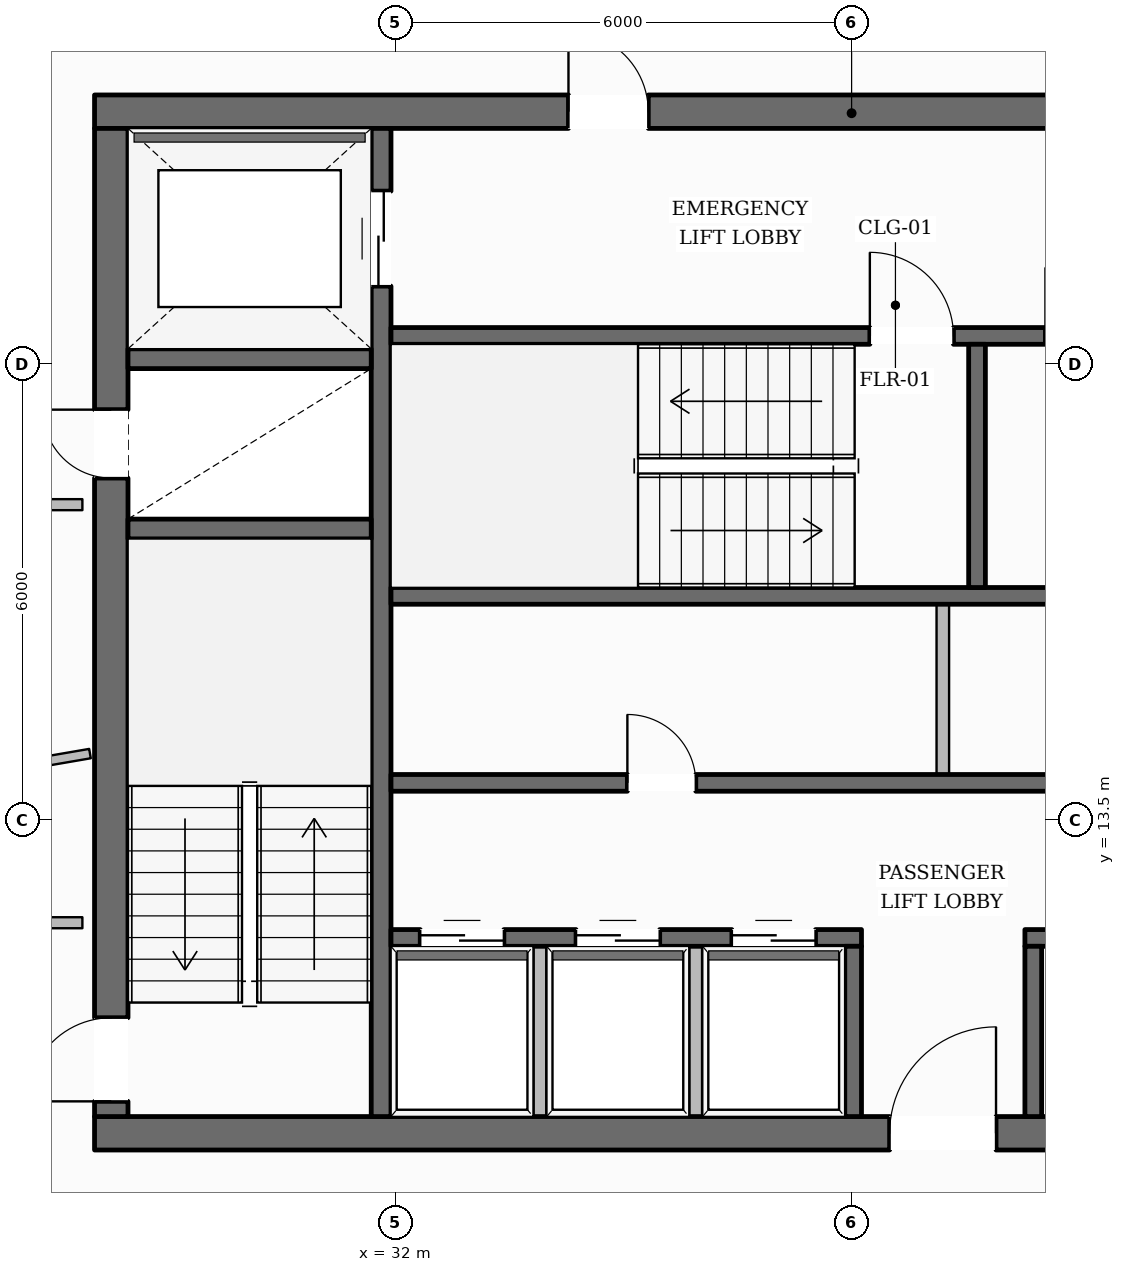
"""IFC4 building model, lengths in metres.
Left out: names, types, materials, properties, quantities, classifications, styles, units other than length and angle.
Written with IfcOpenShell. Run it as: python <this file> out.ifc"""

import sys

from ifc_helpers import new_model, si_unit, direction, frame, frame_2d, origin, place, context, subcontext, project, spatial, rectangle, extrude, element, fill, save


model = new_model("IFC4")
c1 = context("Model", 3, precision=1e-05, world=origin(), true_north=direction((0.0, 1.0)))
c2 = subcontext(c1, "Body", "Model", "MODEL_VIEW")
j1 = project(units=[si_unit("LENGTHUNIT", "METRE"), si_unit("PLANEANGLEUNIT", "RADIAN")], contexts=[c1])
p1 = place(None, origin())
s1 = spatial("IfcSite", under=j1, at=p1, CompositionType="ELEMENT")
p2 = place(p1, origin())
s2 = spatial("IfcBuilding", under=s1, at=p2, CompositionType="ELEMENT")
p3 = place(p2, frame((0.0, 0.0, 188.1)))
s3 = spatial("IfcBuildingStorey", under=s2, at=p3, CompositionType="ELEMENT", Elevation=188.1)
p4 = place(p3, frame((28.04, 9.38, 0.0), z_axis=(0.0, 0.0, 1.0), x_axis=(1.0, 0.0, 0.0)))
e1 = element("IfcWall", 1, at=p4, inside=s3, PredefinedType="SOLIDWALL", context=c2, shape_type="SweptSolid", body=[
    extrude(rectangle(XDim=19.92, YDim=0.44, at=frame_2d((9.96, 0.0))), origin(), (0.0, 0.0, 1.0), 3.6),
])
p5 = place(p4, frame((10.46, 0.0, 0.0)))
e2 = element("IfcOpeningElement", 2, at=p5, cuts=e1, PredefinedType="OPENING", context=c2, shape_type="SweptSolid", body=[
    extrude(rectangle(XDim=1.4, YDim=2.2, at=frame_2d((0.7, 1.1))), frame((0.0, 0.23, 0.0), z_axis=(0.0, -1.0, 0.0), x_axis=(1.0, 0.0, 0.0)), (0.0, 0.0, 1.0), 0.46),
])
p6 = place(p3, frame((28.04, 22.82, 0.0), z_axis=(0.0, 0.0, 1.0), x_axis=(1.0, 0.0, 0.0)))
e3 = element("IfcWall", 3, at=p6, inside=s3, PredefinedType="SOLIDWALL", context=c2, shape_type="SweptSolid", body=[
    extrude(rectangle(XDim=19.92, YDim=0.44, at=frame_2d((9.96, 0.0))), origin(), (0.0, 0.0, 1.0), 3.6),
])
p7 = place(p6, frame((6.235, 0.0, 0.0)))
e4 = element("IfcOpeningElement", 4, at=p7, cuts=e3, PredefinedType="OPENING", context=c2, shape_type="SweptSolid", body=[
    extrude(rectangle(XDim=1.05, YDim=2.15, at=frame_2d((0.525, 1.075))), frame((0.0, 0.23, 0.0), z_axis=(0.0, -1.0, 0.0), x_axis=(1.0, 0.0, 0.0)), (0.0, 0.0, 1.0), 0.46),
])
p8 = place(p6, frame((12.635, 0.0, 0.0)))
e5 = element("IfcOpeningElement", 5, at=p8, cuts=e3, PredefinedType="OPENING", context=c2, shape_type="SweptSolid", body=[
    extrude(rectangle(XDim=1.05, YDim=2.15, at=frame_2d((0.525, 1.075))), frame((0.0, 0.23, 0.0), z_axis=(0.0, -1.0, 0.0), x_axis=(1.0, 0.0, 0.0)), (0.0, 0.0, 1.0), 0.46),
])
p9 = place(p3, frame((28.26, 9.6, 0.0), z_axis=(0.0, 0.0, 1.0), x_axis=(0.0, 1.0, 0.0)))
e6 = element("IfcWall", 6, at=p9, inside=s3, PredefinedType="SOLIDWALL", context=c2, shape_type="SweptSolid", body=[
    extrude(rectangle(XDim=13.0, YDim=0.44, at=frame_2d((6.5, 0.0))), origin(), (0.0, 0.0, 1.0), 3.6),
])
p10 = place(p9, frame((0.2, 0.0, 0.0)))
e7 = element("IfcOpeningElement", 7, at=p10, cuts=e6, PredefinedType="OPENING", context=c2, shape_type="SweptSolid", body=[
    extrude(rectangle(XDim=1.1, YDim=2.15, at=frame_2d((0.55, 1.075))), frame((0.0, 0.23, 0.0), z_axis=(0.0, -1.0, 0.0), x_axis=(1.0, 0.0, 0.0)), (0.0, 0.0, 1.0), 0.46),
])
p11 = place(p9, frame((8.4, 0.0, 0.0)))
e8 = element("IfcOpeningElement", 8, at=p11, cuts=e6, PredefinedType="OPENING", context=c2, shape_type="SweptSolid", body=[
    extrude(rectangle(XDim=0.9, YDim=2.1, at=frame_2d((0.45, 1.05))), frame((0.0, 0.23, 0.0), z_axis=(0.0, -1.0, 0.0), x_axis=(1.0, 0.0, 0.0)), (0.0, 0.0, 1.0), 0.46),
])
p12 = place(p3, frame((31.81, 9.6, 0.0), z_axis=(0.0, 0.0, 1.0), x_axis=(0.0, 1.0, 0.0)))
e9 = element("IfcWall", 9, at=p12, inside=s3, PredefinedType="SHEAR", context=c2, shape_type="SweptSolid", body=[
    extrude(rectangle(XDim=13.0, YDim=0.26, at=frame_2d((6.5, 0.0))), origin(), (0.0, 0.0, 1.0), 3.6),
])
p13 = place(p12, frame((10.925, 0.0, 0.0)))
e10 = element("IfcOpeningElement", 10, at=p13, cuts=e9, PredefinedType="OPENING", context=c2, shape_type="SweptSolid", body=[
    extrude(rectangle(XDim=1.25, YDim=2.25, at=frame_2d((0.625, 1.125))), frame((0.0, 0.14, 0.0), z_axis=(0.0, -1.0, 0.0), x_axis=(1.0, 0.0, 0.0)), (0.0, 0.0, 1.0), 0.28),
])
for number, where, z_axis, x_axis in (
    (11, (28.48, 17.33, 0.0), (0.0, 0.0, 1.0), (1.0, 0.0, 0.0)),
    (12, (28.48, 19.57, 0.0), (0.0, 0.0, 1.0), (1.0, 0.0, 0.0)),
):
    element("IfcWall", number, at=place(p3, frame(where, z_axis=z_axis, x_axis=x_axis)), inside=s3, PredefinedType="SHEAR", context=c2, shape_type="SweptSolid", body=[
        extrude(rectangle(XDim=3.2, YDim=0.26, at=frame_2d((1.6, 0.0))), origin(), (0.0, 0.0, 1.0), 3.6),
    ])
p14 = place(p3, frame((31.94, 19.87, 0.0), z_axis=(0.0, 0.0, 1.0), x_axis=(1.0, 0.0, 0.0)))
e13 = element("IfcWall", 13, at=p14, inside=s3, PredefinedType="SOLIDWALL", context=c2, shape_type="SweptSolid", body=[
    extrude(rectangle(XDim=12.12, YDim=0.22, at=frame_2d((6.06, 0.0))), origin(), (0.0, 0.0, 1.0), 3.6),
])
p15 = place(p14, frame((6.3, 0.0, 0.0)))
e14 = element("IfcOpeningElement", 14, at=p15, cuts=e13, PredefinedType="OPENING", context=c2, shape_type="SweptSolid", body=[
    extrude(rectangle(XDim=1.1, YDim=2.15, at=frame_2d((0.55, 1.075))), frame((0.0, 0.12, 0.0), z_axis=(0.0, -1.0, 0.0), x_axis=(1.0, 0.0, 0.0)), (0.0, 0.0, 1.0), 0.24),
])
p16 = place(p14, frame((8.61, 0.0, 0.0)))
e15 = element("IfcOpeningElement", 15, at=p16, cuts=e13, PredefinedType="OPENING", context=c2, shape_type="SweptSolid", body=[
    extrude(rectangle(XDim=0.9, YDim=2.1, at=frame_2d((0.45, 1.05))), frame((0.0, 0.12, 0.0), z_axis=(0.0, -1.0, 0.0), x_axis=(1.0, 0.0, 0.0)), (0.0, 0.0, 1.0), 0.24),
])
p17 = place(p14, frame((10.85, 0.0, 0.0)))
e16 = element("IfcOpeningElement", 16, at=p17, cuts=e13, PredefinedType="OPENING", context=c2, shape_type="SweptSolid", body=[
    extrude(rectangle(XDim=0.9, YDim=2.1, at=frame_2d((0.45, 1.05))), frame((0.0, 0.12, 0.0), z_axis=(0.0, -1.0, 0.0), x_axis=(1.0, 0.0, 0.0)), (0.0, 0.0, 1.0), 0.24),
])
p18 = place(p3, frame((31.94, 16.45, 0.0), z_axis=(0.0, 0.0, 1.0), x_axis=(1.0, 0.0, 0.0)))
e17 = element("IfcWall", 17, at=p18, inside=s3, PredefinedType="SOLIDWALL", context=c2, shape_type="SweptSolid", body=[
    extrude(rectangle(XDim=12.12, YDim=0.22, at=frame_2d((6.06, 0.0))), origin(), (0.0, 0.0, 1.0), 3.6),
])
p19 = place(p3, frame((39.65, 16.56, 0.0), z_axis=(0.0, 0.0, 1.0), x_axis=(0.0, 1.0, 0.0)))
e18 = element("IfcWall", 18, at=p19, inside=s3, PredefinedType="SOLIDWALL", context=c2, shape_type="SweptSolid", body=[
    extrude(rectangle(XDim=3.2, YDim=0.22, at=frame_2d((1.6, 0.0))), origin(), (0.0, 0.0, 1.0), 3.6),
])
p20 = place(p3, frame((31.94, 13.99, 0.0), z_axis=(0.0, 0.0, 1.0), x_axis=(1.0, 0.0, 0.0)))
e19 = element("IfcWall", 19, at=p20, inside=s3, PredefinedType="SOLIDWALL", context=c2, shape_type="SweptSolid", body=[
    extrude(rectangle(XDim=12.12, YDim=0.22, at=frame_2d((6.06, 0.0))), origin(), (0.0, 0.0, 1.0), 3.6),
])
p21 = place(p20, frame((3.11, 0.0, 0.0)))
e20 = element("IfcOpeningElement", 20, at=p21, cuts=e19, PredefinedType="OPENING", context=c2, shape_type="SweptSolid", body=[
    extrude(rectangle(XDim=0.9, YDim=2.1, at=frame_2d((0.45, 1.05))), frame((0.0, 0.12, 0.0), z_axis=(0.0, -1.0, 0.0), x_axis=(1.0, 0.0, 0.0)), (0.0, 0.0, 1.0), 0.24),
])
p22 = place(p20, frame((9.21, 0.0, 0.0)))
e21 = element("IfcOpeningElement", 21, at=p22, cuts=e19, PredefinedType="OPENING", context=c2, shape_type="SweptSolid", body=[
    extrude(rectangle(XDim=0.9, YDim=2.1, at=frame_2d((0.45, 1.05))), frame((0.0, 0.12, 0.0), z_axis=(0.0, -1.0, 0.0), x_axis=(1.0, 0.0, 0.0)), (0.0, 0.0, 1.0), 0.24),
])
p23 = place(p3, frame((31.94, 11.95, 0.0), z_axis=(0.0, 0.0, 1.0), x_axis=(1.0, 0.0, 0.0)))
e22 = element("IfcWall", 22, at=p23, inside=s3, PredefinedType="SOLIDWALL", context=c2, shape_type="SweptSolid", body=[
    extrude(rectangle(XDim=6.19, YDim=0.22, at=frame_2d((3.095, 0.0))), origin(), (0.0, 0.0, 1.0), 3.6),
])
p24 = place(p23, frame((0.385, 0.0, 0.0)))
e23 = element("IfcOpeningElement", 23, at=p24, cuts=e22, PredefinedType="OPENING", context=c2, shape_type="SweptSolid", body=[
    extrude(rectangle(XDim=1.1, YDim=2.2, at=frame_2d((0.55, 1.1))), frame((0.0, 0.12, 0.0), z_axis=(0.0, -1.0, 0.0), x_axis=(1.0, 0.0, 0.0)), (0.0, 0.0, 1.0), 0.24),
])
p25 = place(p23, frame((2.435, 0.0, 0.0)))
e24 = element("IfcOpeningElement", 24, at=p25, cuts=e22, PredefinedType="OPENING", context=c2, shape_type="SweptSolid", body=[
    extrude(rectangle(XDim=1.1, YDim=2.2, at=frame_2d((0.55, 1.1))), frame((0.0, 0.12, 0.0), z_axis=(0.0, -1.0, 0.0), x_axis=(1.0, 0.0, 0.0)), (0.0, 0.0, 1.0), 0.24),
])
p26 = place(p23, frame((4.485, 0.0, 0.0)))
e25 = element("IfcOpeningElement", 25, at=p26, cuts=e22, PredefinedType="OPENING", context=c2, shape_type="SweptSolid", body=[
    extrude(rectangle(XDim=1.1, YDim=2.2, at=frame_2d((0.55, 1.1))), frame((0.0, 0.12, 0.0), z_axis=(0.0, -1.0, 0.0), x_axis=(1.0, 0.0, 0.0)), (0.0, 0.0, 1.0), 0.24),
])
p27 = place(p3, frame((40.28, 11.95, 0.0), z_axis=(0.0, 0.0, 1.0), x_axis=(1.0, 0.0, 0.0)))
e26 = element("IfcWall", 26, at=p27, inside=s3, PredefinedType="SOLIDWALL", context=c2, shape_type="SweptSolid", body=[
    extrude(rectangle(XDim=3.78, YDim=0.22, at=frame_2d((1.89, 0.0))), origin(), (0.0, 0.0, 1.0), 3.6),
])
p28 = place(p27, frame((1.55, 0.0, 0.0)))
e27 = element("IfcOpeningElement", 27, at=p28, cuts=e26, PredefinedType="OPENING", context=c2, shape_type="SweptSolid", body=[
    extrude(rectangle(XDim=0.9, YDim=2.1, at=frame_2d((0.45, 1.05))), frame((0.0, 0.12, 0.0), z_axis=(0.0, -1.0, 0.0), x_axis=(1.0, 0.0, 0.0)), (0.0, 0.0, 1.0), 0.24),
])
for number, where, z_axis, x_axis in (
    (28, (38.02, 9.6, 0.0), (0.0, 0.0, 1.0), (0.0, 1.0, 0.0)),
    (29, (40.39, 9.6, 0.0), (0.0, 0.0, 1.0), (0.0, 1.0, 0.0)),
):
    element("IfcWall", number, at=place(p3, frame(where, z_axis=z_axis, x_axis=x_axis)), inside=s3, PredefinedType="SOLIDWALL", context=c2, shape_type="SweptSolid", body=[
        extrude(rectangle(XDim=2.24, YDim=0.22, at=frame_2d((1.12, 0.0))), origin(), (0.0, 0.0, 1.0), 3.6),
    ])
p29 = place(p3, frame((15.064, 11.953, 0.0), z_axis=(0.0, 0.0, 1.0), x_axis=(0.495993114815, 0.86832645362, 0.0)))
e30 = element("IfcWall", 30, at=p29, inside=s3, PredefinedType="STANDARD", context=c2, shape_type="SweptSolid", body=[
    extrude(rectangle(XDim=37.324, YDim=0.35, at=frame_2d((18.662, 0.0))), origin(), (0.0, 0.0, 1.0), 3.132),
])
p30 = place(p29, frame((33.087, 0.0, 0.65)))
e31 = element("IfcOpeningElement", 31, at=p30, cuts=e30, PredefinedType="OPENING", context=c2, shape_type="SweptSolid", body=[
    extrude(rectangle(XDim=1.45, YDim=1.75, at=frame_2d((0.725, 0.875))), frame((0.0, 0.185, 0.0), z_axis=(0.0, -1.0, 0.0), x_axis=(1.0, 0.0, 0.0)), (0.0, 0.0, 1.0), 0.37),
])
p31 = place(p29, frame((27.026, 0.0, 0.65)))
e32 = element("IfcOpeningElement", 32, at=p31, cuts=e30, PredefinedType="OPENING", context=c2, shape_type="SweptSolid", body=[
    extrude(rectangle(XDim=1.45, YDim=1.75, at=frame_2d((0.725, 0.875))), frame((0.0, 0.185, 0.0), z_axis=(0.0, -1.0, 0.0), x_axis=(1.0, 0.0, 0.0)), (0.0, 0.0, 1.0), 0.37),
])
p32 = place(p29, frame((14.904, 0.0, 0.65)))
e33 = element("IfcOpeningElement", 33, at=p32, cuts=e30, PredefinedType="OPENING", context=c2, shape_type="SweptSolid", body=[
    extrude(rectangle(XDim=1.45, YDim=1.75, at=frame_2d((0.725, 0.875))), frame((0.0, 0.185, 0.0), z_axis=(0.0, -1.0, 0.0), x_axis=(1.0, 0.0, 0.0)), (0.0, 0.0, 1.0), 0.37),
])
p33 = place(p29, frame((8.844, 0.0, 0.65)))
e34 = element("IfcOpeningElement", 34, at=p33, cuts=e30, PredefinedType="OPENING", context=c2, shape_type="SweptSolid", body=[
    extrude(rectangle(XDim=1.45, YDim=1.75, at=frame_2d((0.725, 0.875))), frame((0.0, 0.185, 0.0), z_axis=(0.0, -1.0, 0.0), x_axis=(1.0, 0.0, 0.0)), (0.0, 0.0, 1.0), 0.37),
])
p34 = place(p29, frame((2.782, 0.0, 0.65)))
e35 = element("IfcOpeningElement", 35, at=p34, cuts=e30, PredefinedType="OPENING", context=c2, shape_type="SweptSolid", body=[
    extrude(rectangle(XDim=1.45, YDim=1.75, at=frame_2d((0.725, 0.875))), frame((0.0, 0.185, 0.0), z_axis=(0.0, -1.0, 0.0), x_axis=(1.0, 0.0, 0.0)), (0.0, 0.0, 1.0), 0.37),
])
for number, where, z_axis, x_axis in (
    (36, (33.9, 9.52, 0.0), (0.0, 0.0, 1.0), (0.0, 1.0, 0.0)),
    (37, (35.95, 9.52, 0.0), (0.0, 0.0, 1.0), (0.0, 1.0, 0.0)),
):
    element("IfcWall", number, at=place(p3, frame(where, z_axis=z_axis, x_axis=x_axis)), inside=s3, PredefinedType="PARTITIONING", context=c2, shape_type="SweptSolid", body=[
        extrude(rectangle(XDim=2.32, YDim=0.165, at=frame_2d((1.16, 0.0))), origin(), (0.0, 0.0, 1.0), 3.6),
    ])
p35 = place(p3, frame((39.2, 14.1, 0.0), z_axis=(0.0, 0.0, 1.0), x_axis=(0.0, 1.0, 0.0)))
e38 = element("IfcWall", 38, at=p35, inside=s3, PredefinedType="PARTITIONING", context=c2, shape_type="SweptSolid", body=[
    extrude(rectangle(XDim=2.24, YDim=0.165, at=frame_2d((1.12, 0.0))), origin(), (0.0, 0.0, 1.0), 3.6),
])
for number, where, z_axis, x_axis in (
    (39, (27.88, 17.65, 0.0), (0.0, 0.0, 1.0), (-1.0, 0.0, 0.0)),
    (40, (26.06, 12.15, 0.0), (0.0, 0.0, 1.0), (1.0, 0.0, 0.0)),
):
    element("IfcWall", number, at=place(p3, frame(where, z_axis=z_axis, x_axis=x_axis)), inside=s3, PredefinedType="PARTITIONING", context=c2, shape_type="SweptSolid", body=[
        extrude(rectangle(XDim=1.82, YDim=0.145, at=frame_2d((0.91, 0.0))), origin(), (0.0, 0.0, 1.0), 3.141),
    ])
p36 = place(p3, frame((27.98, 14.375, 0.0), z_axis=(0.0, 0.0, 1.0), x_axis=(-0.9855033492, -0.169655971646, 0.0)))
e41 = element("IfcWall", 41, at=p36, inside=s3, PredefinedType="PARTITIONING", context=c2, shape_type="SweptSolid", body=[
    extrude(rectangle(XDim=12.315, YDim=0.125, at=frame_2d((6.158, 0.0))), origin(), (0.0, 0.0, 1.0), 3.141),
])
p37 = place(p10, origin())
e42 = element("IfcDoor", 42, at=p37, inside=s3, OperationType="SINGLE_SWING_LEFT", PredefinedType="DOOR", context=c2, shape_type="SweptSolid", body=[
    extrude(rectangle(XDim=1.1, YDim=2.15, at=frame_2d((0.55, 1.075))), frame((0.0, 0.025, 0.0), z_axis=(0.0, -1.0, 0.0), x_axis=(1.0, 0.0, 0.0)), (0.0, 0.0, 1.0), 0.05),
])
fill(e7, e42)
p38 = place(p15, origin())
e43 = element("IfcDoor", 43, at=p38, inside=s3, OperationType="SINGLE_SWING_LEFT", PredefinedType="DOOR", context=c2, shape_type="SweptSolid", body=[
    extrude(rectangle(XDim=1.1, YDim=2.15, at=frame_2d((0.55, 1.075))), frame((0.0, 0.025, 0.0), z_axis=(0.0, -1.0, 0.0), x_axis=(1.0, 0.0, 0.0)), (0.0, 0.0, 1.0), 0.05),
])
fill(e14, e43)
p39 = place(p11, origin())
e44 = element("IfcDoor", 44, at=p39, inside=s3, OperationType="SINGLE_SWING_RIGHT", PredefinedType="DOOR", context=c2, shape_type="SweptSolid", body=[
    extrude(rectangle(XDim=0.9, YDim=2.1, at=frame_2d((0.45, 1.05))), frame((0.0, 0.025, 0.0), z_axis=(0.0, -1.0, 0.0), x_axis=(1.0, 0.0, 0.0)), (0.0, 0.0, 1.0), 0.05),
])
fill(e8, e44)
p40 = place(p7, origin())
e45 = element("IfcDoor", 45, at=p40, inside=s3, OperationType="SINGLE_SWING_LEFT", PredefinedType="DOOR", context=c2, shape_type="SweptSolid", body=[
    extrude(rectangle(XDim=1.05, YDim=2.15, at=frame_2d((0.525, 1.075))), frame((0.0, 0.025, 0.0), z_axis=(0.0, -1.0, 0.0), x_axis=(1.0, 0.0, 0.0)), (0.0, 0.0, 1.0), 0.05),
])
fill(e4, e45)
p41 = place(p13, origin())
e46 = element("IfcDoor", 46, at=p41, inside=s3, OperationType="DOUBLE_DOOR_SLIDING", PredefinedType="DOOR", context=c2, shape_type="SweptSolid", body=[
    extrude(rectangle(XDim=1.25, YDim=2.25, at=frame_2d((0.625, 1.125))), frame((0.0, 0.025, 0.0), z_axis=(0.0, -1.0, 0.0), x_axis=(1.0, 0.0, 0.0)), (0.0, 0.0, 1.0), 0.05),
])
fill(e10, e46)
p42 = place(p5, origin())
e47 = element("IfcDoor", 47, at=p42, inside=s3, OperationType="SINGLE_SWING_RIGHT", PredefinedType="DOOR", context=c2, shape_type="SweptSolid", body=[
    extrude(rectangle(XDim=1.4, YDim=2.2, at=frame_2d((0.7, 1.1))), frame((0.0, 0.025, 0.0), z_axis=(0.0, -1.0, 0.0), x_axis=(1.0, 0.0, 0.0)), (0.0, 0.0, 1.0), 0.05),
])
fill(e2, e47)
p43 = place(p24, origin())
e48 = element("IfcDoor", 48, at=p43, inside=s3, OperationType="DOUBLE_DOOR_SLIDING", PredefinedType="DOOR", context=c2, shape_type="SweptSolid", body=[
    extrude(rectangle(XDim=1.1, YDim=2.2, at=frame_2d((0.55, 1.1))), frame((0.0, 0.025, 0.0), z_axis=(0.0, -1.0, 0.0), x_axis=(1.0, 0.0, 0.0)), (0.0, 0.0, 1.0), 0.05),
])
fill(e23, e48)
p44 = place(p25, origin())
e49 = element("IfcDoor", 49, at=p44, inside=s3, OperationType="DOUBLE_DOOR_SLIDING", PredefinedType="DOOR", context=c2, shape_type="SweptSolid", body=[
    extrude(rectangle(XDim=1.1, YDim=2.2, at=frame_2d((0.55, 1.1))), frame((0.0, 0.025, 0.0), z_axis=(0.0, -1.0, 0.0), x_axis=(1.0, 0.0, 0.0)), (0.0, 0.0, 1.0), 0.05),
])
fill(e24, e49)
p45 = place(p26, origin())
e50 = element("IfcDoor", 50, at=p45, inside=s3, OperationType="DOUBLE_DOOR_SLIDING", PredefinedType="DOOR", context=c2, shape_type="SweptSolid", body=[
    extrude(rectangle(XDim=1.1, YDim=2.2, at=frame_2d((0.55, 1.1))), frame((0.0, 0.025, 0.0), z_axis=(0.0, -1.0, 0.0), x_axis=(1.0, 0.0, 0.0)), (0.0, 0.0, 1.0), 0.05),
])
fill(e25, e50)
p46 = place(p21, origin())
e51 = element("IfcDoor", 51, at=p46, inside=s3, OperationType="SINGLE_SWING_LEFT", PredefinedType="DOOR", context=c2, shape_type="SweptSolid", body=[
    extrude(rectangle(XDim=0.9, YDim=2.1, at=frame_2d((0.45, 1.05))), frame((0.0, 0.025, 0.0), z_axis=(0.0, -1.0, 0.0), x_axis=(1.0, 0.0, 0.0)), (0.0, 0.0, 1.0), 0.05),
])
fill(e20, e51)
save(model, sys.argv[1])
